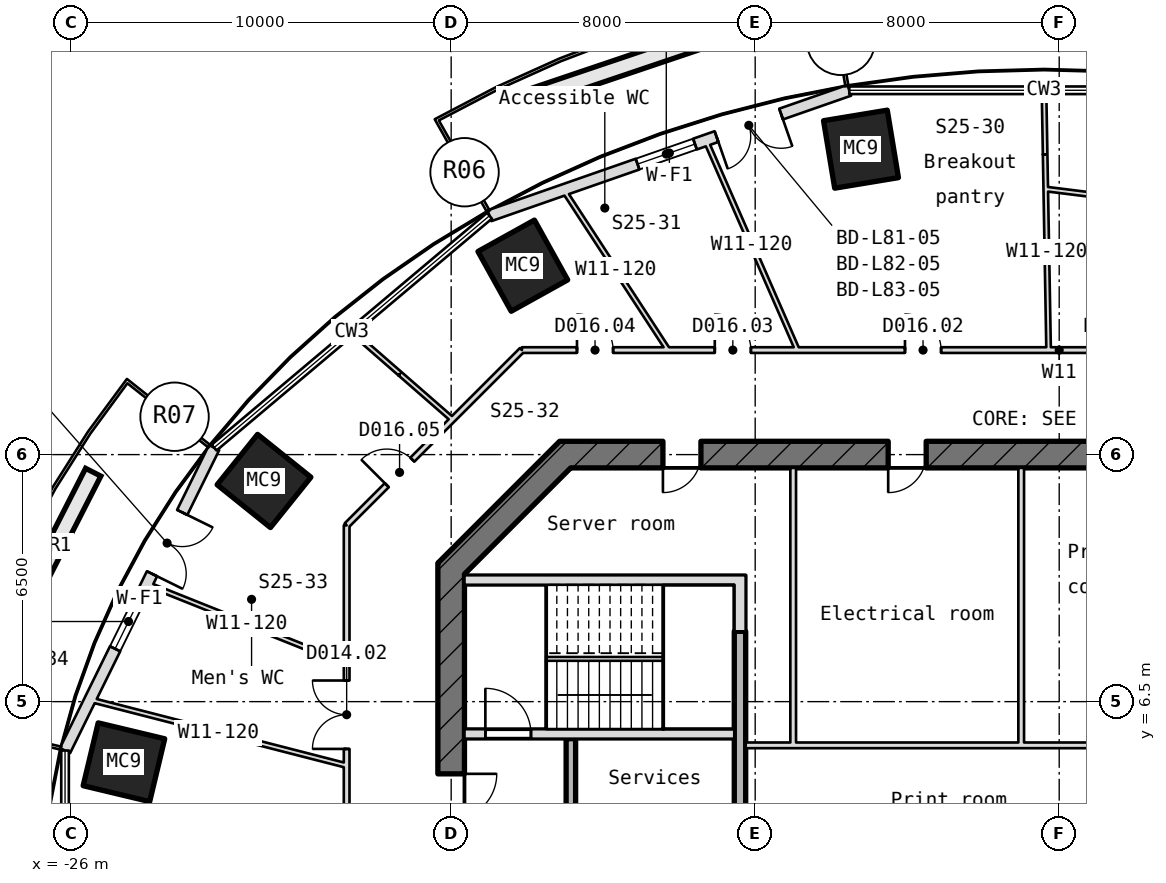
"""IFC4 building model, lengths in metres.
Left out: names, types, materials, properties, quantities, classifications, styles, units other than length and angle.
Written with IfcOpenShell. Run it as: python <this file> out.ifc"""

import sys

from ifc_helpers import new_model, si_unit, direction, frame, frame_2d, origin, origin_2d, place, context, subcontext, project, spatial, rectangle, hollow_rectangle, extrude, element, fill, save


model = new_model("IFC4")
c1 = context("Model", 3, precision=1e-05, world=origin(), true_north=direction((0.0, 1.0)))
c2 = subcontext(c1, "Body", "Model", "MODEL_VIEW")
j1 = project(units=[si_unit("LENGTHUNIT", "METRE"), si_unit("PLANEANGLEUNIT", "RADIAN")], contexts=[c1])
p1 = place(None, origin())
s1 = spatial("IfcSite", under=j1, at=p1, CompositionType="ELEMENT")
p2 = place(p1, origin())
s2 = spatial("IfcBuilding", under=s1, at=p2, CompositionType="ELEMENT")
p3 = place(p2, frame((0.0, 0.0, 359.2)))
s3 = spatial("IfcBuildingStorey", under=s2, at=p3, CompositionType="ELEMENT", Elevation=359.2)
for number, where, z_axis, x_axis in (
    (1, (-5.216, 21.037, -0.18), (0.0, 0.0, 1.0), (0.987, 0.163, 0.0)),
    (2, (-14.114, 17.971, -0.18), (0.0, 0.0, 1.0), (0.874, 0.486, 0.0)),
    (3, (-20.925, 12.306, -0.18), (0.0, 0.0, 1.0), (0.626, 0.78, 0.0)),
    (4, (-24.611, 4.906, -0.18), (0.0, 0.0, 1.0), (0.233, 0.973, 0.0)),
):
    element("IfcColumn", number, at=place(p3, frame(where, z_axis=z_axis, x_axis=x_axis)), inside=s3, PredefinedType="COLUMN", context=c2, shape_type="SweptSolid", body=[
        extrude(hollow_rectangle(XDim=1.7, YDim=1.8, WallThickness=0.05, at=origin_2d()), origin(), (0.0, 0.0, 1.0), 4.15),
    ])
p4 = place(p3, frame((-5.524, 22.586, 0.0), z_axis=(0.0, 0.0, 1.0), x_axis=(-0.944242611416, -0.329250498535, 0.0)))
e5 = element("IfcWall", 5, at=p4, inside=s3, PredefinedType="SOLIDWALL", context=c2, shape_type="SweptSolid", body=[
    extrude(rectangle(XDim=10.027, YDim=0.3, at=frame_2d((5.014, 0.0))), origin(), (0.0, 0.0, 1.0), 3.97),
])
p5 = place(p4, frame((1.9, 0.0, 0.0)))
e6 = element("IfcOpeningElement", 6, at=p5, cuts=e5, PredefinedType="OPENING", context=c2, shape_type="SweptSolid", body=[
    extrude(rectangle(XDim=1.8, YDim=2.4, at=frame_2d((0.9, 1.2))), frame((0.0, 0.16, 0.0), z_axis=(0.0, -1.0, 0.0), x_axis=(1.0, 0.0, 0.0)), (0.0, 0.0, 1.0), 0.32),
])
p6 = place(p4, frame((4.3, 0.0, 0.9)))
e7 = element("IfcOpeningElement", 7, at=p6, cuts=e5, PredefinedType="OPENING", context=c2, shape_type="SweptSolid", body=[
    extrude(rectangle(XDim=1.6, YDim=1.5, at=frame_2d((0.8, 0.75))), frame((0.0, 0.16, 0.0), z_axis=(0.0, -1.0, 0.0), x_axis=(1.0, 0.0, 0.0)), (0.0, 0.0, 1.0), 0.32),
])
p7 = place(p3, frame((-22.239, 13.184, 0.0), z_axis=(0.0, 0.0, 1.0), x_axis=(-0.441498870894, -0.89726180516, 0.0)))
e8 = element("IfcWall", 8, at=p7, inside=s3, PredefinedType="SOLIDWALL", context=c2, shape_type="SweptSolid", body=[
    extrude(rectangle(XDim=8.883, YDim=0.3, at=frame_2d((4.441, 0.0))), origin(), (0.0, 0.0, 1.0), 3.97),
])
p8 = place(p7, frame((1.9, 0.0, 0.0)))
e9 = element("IfcOpeningElement", 9, at=p8, cuts=e8, PredefinedType="OPENING", context=c2, shape_type="SweptSolid", body=[
    extrude(rectangle(XDim=1.8, YDim=2.4, at=frame_2d((0.9, 1.2))), frame((0.0, 0.16, 0.0), z_axis=(0.0, -1.0, 0.0), x_axis=(1.0, 0.0, 0.0)), (0.0, 0.0, 1.0), 0.32),
])
p9 = place(p7, frame((4.3, 0.0, 0.9)))
e10 = element("IfcOpeningElement", 10, at=p9, cuts=e8, PredefinedType="OPENING", context=c2, shape_type="SweptSolid", body=[
    extrude(rectangle(XDim=1.6, YDim=1.5, at=frame_2d((0.8, 0.75))), frame((0.0, 0.16, 0.0), z_axis=(0.0, -1.0, 0.0), x_axis=(1.0, 0.0, 0.0)), (0.0, 0.0, 1.0), 0.32),
])
p10 = place(p3, frame((13.145, 13.0, -0.18), z_axis=(0.0, 0.0, 1.0), x_axis=(-1.0, 0.0, 0.0)))
e11 = element("IfcWall", 11, at=p10, inside=s3, PredefinedType="SHEAR", context=c2, shape_type="SweptSolid", body=[
    extrude(rectangle(XDim=26.29, YDim=0.7, at=frame_2d((13.145, 0.0))), origin(), (0.0, 0.0, 1.0), 4.15),
])
p11 = place(p10, frame((22.573, 0.0, 0.18)))
e12 = element("IfcOpeningElement", 12, at=p11, cuts=e11, PredefinedType="OPENING", context=c2, shape_type="SweptSolid", body=[
    extrude(rectangle(XDim=1.0, YDim=2.1, at=frame_2d((0.5, 1.05))), frame((0.0, 0.36, 0.0), z_axis=(0.0, -1.0, 0.0), x_axis=(1.0, 0.0, 0.0)), (0.0, 0.0, 1.0), 0.72),
])
p12 = place(p10, frame((16.645, 0.0, 0.18)))
e13 = element("IfcOpeningElement", 13, at=p12, cuts=e11, PredefinedType="OPENING", context=c2, shape_type="SweptSolid", body=[
    extrude(rectangle(XDim=1.0, YDim=2.1, at=frame_2d((0.5, 1.05))), frame((0.0, 0.36, 0.0), z_axis=(0.0, -1.0, 0.0), x_axis=(1.0, 0.0, 0.0)), (0.0, 0.0, 1.0), 0.72),
])
p13 = place(p10, frame((11.145, 0.0, 0.18)))
e14 = element("IfcOpeningElement", 14, at=p13, cuts=e11, PredefinedType="OPENING", context=c2, shape_type="SweptSolid", body=[
    extrude(rectangle(XDim=1.0, YDim=2.1, at=frame_2d((0.5, 1.05))), frame((0.0, 0.36, 0.0), z_axis=(0.0, -1.0, 0.0), x_axis=(1.0, 0.0, 0.0)), (0.0, 0.0, 1.0), 0.72),
])
p14 = place(p10, frame((4.217, 0.0, 0.18)))
e15 = element("IfcOpeningElement", 15, at=p14, cuts=e11, PredefinedType="OPENING", context=c2, shape_type="SweptSolid", body=[
    extrude(rectangle(XDim=1.0, YDim=2.1, at=frame_2d((0.5, 1.05))), frame((0.0, 0.36, 0.0), z_axis=(0.0, -1.0, 0.0), x_axis=(1.0, 0.0, 0.0)), (0.0, 0.0, 1.0), 0.72),
])
p15 = place(p3, frame((-12.897, 13.103, -0.18), z_axis=(0.0, 0.0, 1.0), x_axis=(-0.707106781187, -0.707106781187, 0.0)))
e16 = element("IfcWall", 16, at=p15, inside=s3, PredefinedType="SHEAR", context=c2, shape_type="SweptSolid", body=[
    extrude(rectangle(XDim=4.533, YDim=0.7, at=frame_2d((2.266, 0.0))), origin(), (0.0, 0.0, 1.0), 4.15),
])
p16 = place(p3, frame((-16.0, 10.145, -0.18), z_axis=(0.0, 0.0, 1.0), x_axis=(0.0, -1.0, 0.0)))
e17 = element("IfcWall", 17, at=p16, inside=s3, PredefinedType="SHEAR", context=c2, shape_type="SweptSolid", body=[
    extrude(rectangle(XDim=20.29, YDim=0.7, at=frame_2d((10.145, 0.0))), origin(), (0.0, 0.0, 1.0), 4.15),
])
p17 = place(p16, frame((8.945, 0.0, 0.18)))
e18 = element("IfcOpeningElement", 18, at=p17, cuts=e17, PredefinedType="OPENING", context=c2, shape_type="SweptSolid", body=[
    extrude(rectangle(XDim=2.4, YDim=2.1, at=frame_2d((1.2, 1.05))), frame((0.0, 0.36, 0.0), z_axis=(0.0, -1.0, 0.0), x_axis=(1.0, 0.0, 0.0)), (0.0, 0.0, 1.0), 0.72),
])
p18 = place(p16, frame((5.545, 0.0, 0.18)))
e19 = element("IfcOpeningElement", 19, at=p18, cuts=e17, PredefinedType="OPENING", context=c2, shape_type="SweptSolid", body=[
    extrude(rectangle(XDim=1.2, YDim=2.1, at=frame_2d((0.6, 1.05))), frame((0.0, 0.36, 0.0), z_axis=(0.0, -1.0, 0.0), x_axis=(1.0, 0.0, 0.0)), (0.0, 0.0, 1.0), 0.72),
])
p19 = place(p3, frame((-8.25, 5.35, 0.0), z_axis=(0.0, 0.0, 1.0), x_axis=(1.0, 0.0, 0.0)))
e20 = element("IfcWall", 20, at=p19, inside=s3, PredefinedType="PARTITIONING", context=c2, shape_type="SweptSolid", body=[
    extrude(rectangle(XDim=11.05, YDim=0.15, at=frame_2d((5.525, 0.0))), origin(), (0.0, 0.0, 1.0), 3.97),
])
p20 = place(p3, frame((-15.65, 5.65, -0.18), z_axis=(0.0, 0.0, 1.0), x_axis=(1.0, 0.0, 0.0)))
e21 = element("IfcWall", 21, at=p20, inside=s3, PredefinedType="SHEAR", context=c2, shape_type="SweptSolid", body=[
    extrude(rectangle(XDim=7.1, YDim=0.25, at=frame_2d((3.55, 0.0))), origin(), (0.0, 0.0, 1.0), 4.15),
])
p21 = place(p20, frame((0.55, 0.0, 0.18)))
e22 = element("IfcOpeningElement", 22, at=p21, cuts=e21, PredefinedType="OPENING", context=c2, shape_type="SweptSolid", body=[
    extrude(rectangle(XDim=1.2, YDim=2.1, at=frame_2d((0.6, 1.05))), frame((0.0, 0.135, 0.0), z_axis=(0.0, -1.0, 0.0), x_axis=(1.0, 0.0, 0.0)), (0.0, 0.0, 1.0), 0.27),
])
p22 = place(p3, frame((-15.65, 9.7, -0.18), z_axis=(0.0, 0.0, 1.0), x_axis=(1.0, 0.0, 0.0)))
e23 = element("IfcWall", 23, at=p22, inside=s3, PredefinedType="SHEAR", context=c2, shape_type="SweptSolid", body=[
    extrude(rectangle(XDim=7.1, YDim=0.25, at=frame_2d((3.55, 0.0))), origin(), (0.0, 0.0, 1.0), 4.15),
])
p23 = place(p3, frame((-12.85, 2.475, 0.0), z_axis=(0.0, 0.0, 1.0), x_axis=(0.0, 1.0, 0.0)))
e24 = element("IfcWall", 24, at=p23, inside=s3, PredefinedType="STANDARD", context=c2, shape_type="SweptSolid", body=[
    extrude(rectangle(XDim=3.05, YDim=0.25, at=frame_2d((1.525, 0.0))), origin(), (0.0, 0.0, 1.0), 3.97),
])
p24 = place(p3, frame((-8.4, 2.5, -0.18), z_axis=(0.0, 0.0, 1.0), x_axis=(0.0, 1.0, 0.0)))
e25 = element("IfcWall", 25, at=p24, inside=s3, PredefinedType="SHEAR", context=c2, shape_type="SweptSolid", body=[
    extrude(rectangle(XDim=5.85, YDim=0.3, at=frame_2d((2.925, 0.0))), origin(), (0.0, 0.0, 1.0), 4.15),
])
p25 = place(p3, frame((-8.4, 8.35, -0.18), z_axis=(0.0, 0.0, 1.0), x_axis=(0.0, 1.0, 0.0)))
e26 = element("IfcWall", 26, at=p25, inside=s3, PredefinedType="SHEAR", context=c2, shape_type="SweptSolid", body=[
    extrude(rectangle(XDim=1.475, YDim=0.3, at=frame_2d((0.737, 0.0))), origin(), (0.0, 0.0, 1.0), 4.15),
])
for number, where, z_axis, x_axis in (
    (27, (-7.0, 5.425, 0.0), (0.0, 0.0, 1.0), (0.0, 1.0, 0.0)),
    (28, (-1.0, 5.425, 0.0), (0.0, 0.0, 1.0), (0.0, 1.0, 0.0)),
):
    element("IfcWall", number, at=place(p3, frame(where, z_axis=z_axis, x_axis=x_axis)), inside=s3, PredefinedType="PARTITIONING", context=c2, shape_type="SweptSolid", body=[
        extrude(rectangle(XDim=7.225, YDim=0.15, at=frame_2d((3.612, 0.0))), origin(), (0.0, 0.0, 1.0), 3.97),
    ])
p26 = place(p3, frame((-18.75, -11.139, 0.0), z_axis=(0.0, 0.0, 1.0), x_axis=(0.0, 1.0, 0.0)))
e29 = element("IfcWall", 29, at=p26, inside=s3, PredefinedType="PARTITIONING", context=c2, shape_type="SweptSolid", body=[
    extrude(rectangle(XDim=22.278, YDim=0.15, at=frame_2d((11.139, 0.0))), origin(), (0.0, 0.0, 1.0), 3.97),
])
p27 = place(p26, frame((16.395, 0.0, 0.0)))
e30 = element("IfcOpeningElement", 30, at=p27, cuts=e29, PredefinedType="OPENING", context=c2, shape_type="SweptSolid", body=[
    extrude(rectangle(XDim=1.8, YDim=2.1, at=frame_2d((0.9, 1.05))), frame((0.0, 0.085, 0.0), z_axis=(0.0, -1.0, 0.0), x_axis=(1.0, 0.0, 0.0)), (0.0, 0.0, 1.0), 0.17),
])
p28 = place(p26, frame((5.417, 0.0, 0.0)))
e31 = element("IfcOpeningElement", 31, at=p28, cuts=e29, PredefinedType="OPENING", context=c2, shape_type="SweptSolid", body=[
    extrude(rectangle(XDim=0.95, YDim=2.1, at=frame_2d((0.475, 1.05))), frame((0.0, 0.085, 0.0), z_axis=(0.0, -1.0, 0.0), x_axis=(1.0, 0.0, 0.0)), (0.0, 0.0, 1.0), 0.17),
])
p29 = place(p3, frame((-18.75, 4.817, 0.0), z_axis=(0.0, 0.0, 1.0), x_axis=(-0.968546007416, 0.248834546472, 0.0)))
e32 = element("IfcWall", 32, at=p29, inside=s3, PredefinedType="PARTITIONING", context=c2, shape_type="SweptSolid", body=[
    extrude(rectangle(XDim=6.971, YDim=0.12, at=frame_2d((3.485, 0.0))), origin(), (0.0, 0.0, 1.0), 3.97),
])
p30 = place(p3, frame((-18.75, 7.495, 0.0), z_axis=(0.0, 0.0, 1.0), x_axis=(-0.928562955477, 0.371174942197, 0.0)))
e33 = element("IfcWall", 33, at=p30, inside=s3, PredefinedType="PARTITIONING", context=c2, shape_type="SweptSolid", body=[
    extrude(rectangle(XDim=5.659, YDim=0.12, at=frame_2d((2.829, 0.0))), origin(), (0.0, 0.0, 1.0), 3.97),
])
p31 = place(p3, frame((-18.75, 11.139, 0.0), z_axis=(0.0, 0.0, 1.0), x_axis=(0.707106781187, 0.707106781187, 0.0)))
e34 = element("IfcWall", 34, at=p31, inside=s3, PredefinedType="PARTITIONING", context=c2, shape_type="SweptSolid", body=[
    extrude(rectangle(XDim=6.521, YDim=0.15, at=frame_2d((3.26, 0.0))), origin(), (0.0, 0.0, 1.0), 3.97),
])
p32 = place(p31, frame((1.494, 0.0, 0.0)))
e35 = element("IfcOpeningElement", 35, at=p32, cuts=e34, PredefinedType="OPENING", context=c2, shape_type="SweptSolid", body=[
    extrude(rectangle(XDim=0.95, YDim=2.1, at=frame_2d((0.475, 1.05))), frame((0.0, 0.085, 0.0), z_axis=(0.0, -1.0, 0.0), x_axis=(1.0, 0.0, 0.0)), (0.0, 0.0, 1.0), 0.17),
])
p33 = place(p3, frame((-15.966, 13.924, 0.0), z_axis=(0.0, 0.0, 1.0), x_axis=(-0.753716775668, 0.657199377721, 0.0)))
e36 = element("IfcWall", 36, at=p33, inside=s3, PredefinedType="PARTITIONING", context=c2, shape_type="SweptSolid", body=[
    extrude(rectangle(XDim=1.829, YDim=0.12, at=frame_2d((0.915, 0.0))), origin(), (0.0, 0.0, 1.0), 3.668),
])
p34 = place(p3, frame((-17.344, 15.125, 0.0), z_axis=(0.0, 0.0, 1.0), x_axis=(-0.753588886898, 0.657346019645, 0.0)))
e37 = element("IfcWall", 37, at=p34, inside=s3, PredefinedType="PARTITIONING", context=c2, shape_type="SweptSolid", body=[
    extrude(rectangle(XDim=1.687, YDim=0.12, at=frame_2d((0.844, 0.0))), origin(), (0.0, 0.0, 1.0), 3.97),
])
p35 = place(p3, frame((-14.139, 15.75, 0.0), z_axis=(0.0, 0.0, 1.0), x_axis=(1.0, 0.0, 0.0)))
e38 = element("IfcWall", 38, at=p35, inside=s3, PredefinedType="PARTITIONING", context=c2, shape_type="SweptSolid", body=[
    extrude(rectangle(XDim=28.278, YDim=0.15, at=frame_2d((14.139, 0.0))), origin(), (0.0, 0.0, 1.0), 3.97),
])
p36 = place(p35, frame((15.37, 0.0, 0.0)))
e39 = element("IfcOpeningElement", 39, at=p36, cuts=e38, PredefinedType="OPENING", context=c2, shape_type="SweptSolid", body=[
    extrude(rectangle(XDim=0.95, YDim=2.1, at=frame_2d((0.475, 1.05))), frame((0.0, 0.085, 0.0), z_axis=(0.0, -1.0, 0.0), x_axis=(1.0, 0.0, 0.0)), (0.0, 0.0, 1.0), 0.17),
])
p37 = place(p35, frame((10.081, 0.0, 0.0)))
e40 = element("IfcOpeningElement", 40, at=p37, cuts=e38, PredefinedType="OPENING", context=c2, shape_type="SweptSolid", body=[
    extrude(rectangle(XDim=0.95, YDim=2.1, at=frame_2d((0.475, 1.05))), frame((0.0, 0.085, 0.0), z_axis=(0.0, -1.0, 0.0), x_axis=(1.0, 0.0, 0.0)), (0.0, 0.0, 1.0), 0.17),
])
p38 = place(p35, frame((5.076, 0.0, 0.0)))
e41 = element("IfcOpeningElement", 41, at=p38, cuts=e38, PredefinedType="OPENING", context=c2, shape_type="SweptSolid", body=[
    extrude(rectangle(XDim=0.95, YDim=2.1, at=frame_2d((0.475, 1.05))), frame((0.0, 0.085, 0.0), z_axis=(0.0, -1.0, 0.0), x_axis=(1.0, 0.0, 0.0)), (0.0, 0.0, 1.0), 0.17),
])
p39 = place(p35, frame((1.45, 0.0, 0.0)))
e42 = element("IfcOpeningElement", 42, at=p39, cuts=e38, PredefinedType="OPENING", context=c2, shape_type="SweptSolid", body=[
    extrude(rectangle(XDim=0.95, YDim=2.1, at=frame_2d((0.475, 1.05))), frame((0.0, 0.085, 0.0), z_axis=(0.0, -1.0, 0.0), x_axis=(1.0, 0.0, 0.0)), (0.0, 0.0, 1.0), 0.17),
])
p40 = place(p3, frame((-10.29, 15.75, 0.0), z_axis=(0.0, 0.0, 1.0), x_axis=(-0.546976229458, 0.837148137672, 0.0)))
e43 = element("IfcWall", 43, at=p40, inside=s3, PredefinedType="PARTITIONING", context=c2, shape_type="SweptSolid", body=[
    extrude(rectangle(XDim=5.034, YDim=0.12, at=frame_2d((2.517, 0.0))), origin(), (0.0, 0.0, 1.0), 3.97),
])
p41 = place(p3, frame((-6.887, 15.75, 0.0), z_axis=(0.0, 0.0, 1.0), x_axis=(-0.400678502876, 0.916218716974, 0.0)))
e44 = element("IfcWall", 44, at=p41, inside=s3, PredefinedType="PARTITIONING", context=c2, shape_type="SweptSolid", body=[
    extrude(rectangle(XDim=6.024, YDim=0.12, at=frame_2d((3.012, 0.0))), origin(), (0.0, 0.0, 1.0), 3.97),
])
p42 = place(p3, frame((-0.279, 15.75, 0.0), z_axis=(0.0, 0.0, 1.0), x_axis=(-0.017734938517, 0.99984272361, 0.0)))
e45 = element("IfcWall", 45, at=p42, inside=s3, PredefinedType="PARTITIONING", context=c2, shape_type="SweptSolid", body=[
    extrude(rectangle(XDim=5.148, YDim=0.12, at=frame_2d((2.574, 0.0))), origin(), (0.0, 0.0, 1.0), 3.617),
])
p43 = place(p3, frame((-0.37, 20.898, 0.0), z_axis=(0.0, 0.0, 1.0), x_axis=(-0.017637510488, 0.999844447014, 0.0)))
e46 = element("IfcWall", 46, at=p43, inside=s3, PredefinedType="PARTITIONING", context=c2, shape_type="SweptSolid", body=[
    extrude(rectangle(XDim=1.689, YDim=0.12, at=frame_2d((0.844, 0.0))), origin(), (0.0, 0.0, 1.0), 3.97),
])
p44 = place(p3, frame((4.541, 19.376, 0.0), z_axis=(0.0, 0.0, 1.0), x_axis=(-0.99227254585, 0.124077374056, 0.0)))
e47 = element("IfcWall", 47, at=p44, inside=s3, PredefinedType="PARTITIONING", context=c2, shape_type="SweptSolid", body=[
    extrude(rectangle(XDim=4.933, YDim=0.12, at=frame_2d((2.466, 0.0))), origin(), (0.0, 0.0, 1.0), 3.97),
])
p45 = place(p5, origin())
e48 = element("IfcDoor", 48, at=p45, inside=s3, OperationType="SINGLE_SWING_LEFT", PredefinedType="DOOR", context=c2, shape_type="SweptSolid", body=[
    extrude(rectangle(XDim=1.8, YDim=2.4, at=frame_2d((0.9, 1.2))), frame((0.0, 0.025, 0.0), z_axis=(0.0, -1.0, 0.0), x_axis=(1.0, 0.0, 0.0)), (0.0, 0.0, 1.0), 0.05),
])
fill(e6, e48)
p46 = place(p6, origin())
e49 = element("IfcWindow", 49, at=p46, inside=s3, PartitioningType="SINGLE_PANEL", PredefinedType="WINDOW", context=c2, shape_type="SweptSolid", body=[
    extrude(rectangle(XDim=1.6, YDim=1.5, at=frame_2d((0.8, 0.75))), frame((0.0, 0.03, 0.0), z_axis=(0.0, -1.0, 0.0), x_axis=(1.0, 0.0, 0.0)), (0.0, 0.0, 1.0), 0.06),
])
fill(e7, e49)
p47 = place(p8, origin())
e50 = element("IfcDoor", 50, at=p47, inside=s3, OperationType="SINGLE_SWING_LEFT", PredefinedType="DOOR", context=c2, shape_type="SweptSolid", body=[
    extrude(rectangle(XDim=1.8, YDim=2.4, at=frame_2d((0.9, 1.2))), frame((0.0, 0.025, 0.0), z_axis=(0.0, -1.0, 0.0), x_axis=(1.0, 0.0, 0.0)), (0.0, 0.0, 1.0), 0.05),
])
fill(e9, e50)
p48 = place(p9, origin())
e51 = element("IfcWindow", 51, at=p48, inside=s3, PartitioningType="SINGLE_PANEL", PredefinedType="WINDOW", context=c2, shape_type="SweptSolid", body=[
    extrude(rectangle(XDim=1.6, YDim=1.5, at=frame_2d((0.8, 0.75))), frame((0.0, 0.03, 0.0), z_axis=(0.0, -1.0, 0.0), x_axis=(1.0, 0.0, 0.0)), (0.0, 0.0, 1.0), 0.06),
])
fill(e10, e51)
p49 = place(p21, origin())
e52 = element("IfcDoor", 52, at=p49, inside=s3, OperationType="SINGLE_SWING_RIGHT", PredefinedType="DOOR", context=c2, shape_type="SweptSolid", body=[
    extrude(rectangle(XDim=1.2, YDim=2.1, at=frame_2d((0.6, 1.05))), frame((0.0, 0.025, 0.0), z_axis=(0.0, -1.0, 0.0), x_axis=(1.0, 0.0, 0.0)), (0.0, 0.0, 1.0), 0.05),
])
fill(e22, e52)
p50 = place(p18, origin())
e53 = element("IfcDoor", 53, at=p50, inside=s3, OperationType="SINGLE_SWING_RIGHT", PredefinedType="DOOR", context=c2, shape_type="SweptSolid", body=[
    extrude(rectangle(XDim=1.2, YDim=2.1, at=frame_2d((0.6, 1.05))), frame((0.0, 0.025, 0.0), z_axis=(0.0, -1.0, 0.0), x_axis=(1.0, 0.0, 0.0)), (0.0, 0.0, 1.0), 0.05),
])
fill(e19, e53)
p51 = place(p11, origin())
e54 = element("IfcDoor", 54, at=p51, inside=s3, OperationType="SINGLE_SWING_RIGHT", PredefinedType="DOOR", context=c2, shape_type="SweptSolid", body=[
    extrude(rectangle(XDim=1.0, YDim=2.1, at=frame_2d((0.5, 1.05))), frame((0.0, 0.025, 0.0), z_axis=(0.0, -1.0, 0.0), x_axis=(1.0, 0.0, 0.0)), (0.0, 0.0, 1.0), 0.05),
])
fill(e12, e54)
p52 = place(p12, origin())
e55 = element("IfcDoor", 55, at=p52, inside=s3, OperationType="SINGLE_SWING_RIGHT", PredefinedType="DOOR", context=c2, shape_type="SweptSolid", body=[
    extrude(rectangle(XDim=1.0, YDim=2.1, at=frame_2d((0.5, 1.05))), frame((0.0, 0.025, 0.0), z_axis=(0.0, -1.0, 0.0), x_axis=(1.0, 0.0, 0.0)), (0.0, 0.0, 1.0), 0.05),
])
fill(e13, e55)
p53 = place(p37, origin())
e56 = element("IfcDoor", 56, at=p53, inside=s3, OperationType="SINGLE_SWING_RIGHT", PredefinedType="DOOR", context=c2, shape_type="SweptSolid", body=[
    extrude(rectangle(XDim=0.95, YDim=2.1, at=frame_2d((0.475, 1.05))), frame((0.0, 0.025, 0.0), z_axis=(0.0, -1.0, 0.0), x_axis=(1.0, 0.0, 0.0)), (0.0, 0.0, 1.0), 0.05),
])
fill(e40, e56)
p54 = place(p38, origin())
e57 = element("IfcDoor", 57, at=p54, inside=s3, OperationType="SINGLE_SWING_RIGHT", PredefinedType="DOOR", context=c2, shape_type="SweptSolid", body=[
    extrude(rectangle(XDim=0.95, YDim=2.1, at=frame_2d((0.475, 1.05))), frame((0.0, 0.025, 0.0), z_axis=(0.0, -1.0, 0.0), x_axis=(1.0, 0.0, 0.0)), (0.0, 0.0, 1.0), 0.05),
])
fill(e41, e57)
p55 = place(p39, origin())
e58 = element("IfcDoor", 58, at=p55, inside=s3, OperationType="SINGLE_SWING_RIGHT", PredefinedType="DOOR", context=c2, shape_type="SweptSolid", body=[
    extrude(rectangle(XDim=0.95, YDim=2.1, at=frame_2d((0.475, 1.05))), frame((0.0, 0.025, 0.0), z_axis=(0.0, -1.0, 0.0), x_axis=(1.0, 0.0, 0.0)), (0.0, 0.0, 1.0), 0.05),
])
fill(e42, e58)
p56 = place(p32, origin())
e59 = element("IfcDoor", 59, at=p56, inside=s3, OperationType="SINGLE_SWING_RIGHT", PredefinedType="DOOR", context=c2, shape_type="SweptSolid", body=[
    extrude(rectangle(XDim=0.95, YDim=2.1, at=frame_2d((0.475, 1.05))), frame((0.0, 0.025, 0.0), z_axis=(0.0, -1.0, 0.0), x_axis=(1.0, 0.0, 0.0)), (0.0, 0.0, 1.0), 0.05),
])
fill(e35, e59)
p57 = place(p27, origin())
e60 = element("IfcDoor", 60, at=p57, inside=s3, OperationType="DOUBLE_DOOR_SINGLE_SWING", PredefinedType="DOOR", context=c2, shape_type="SweptSolid", body=[
    extrude(rectangle(XDim=1.8, YDim=2.1, at=frame_2d((0.9, 1.05))), frame((0.0, 0.025, 0.0), z_axis=(0.0, -1.0, 0.0), x_axis=(1.0, 0.0, 0.0)), (0.0, 0.0, 1.0), 0.05),
])
fill(e30, e60)
save(model, sys.argv[1])
